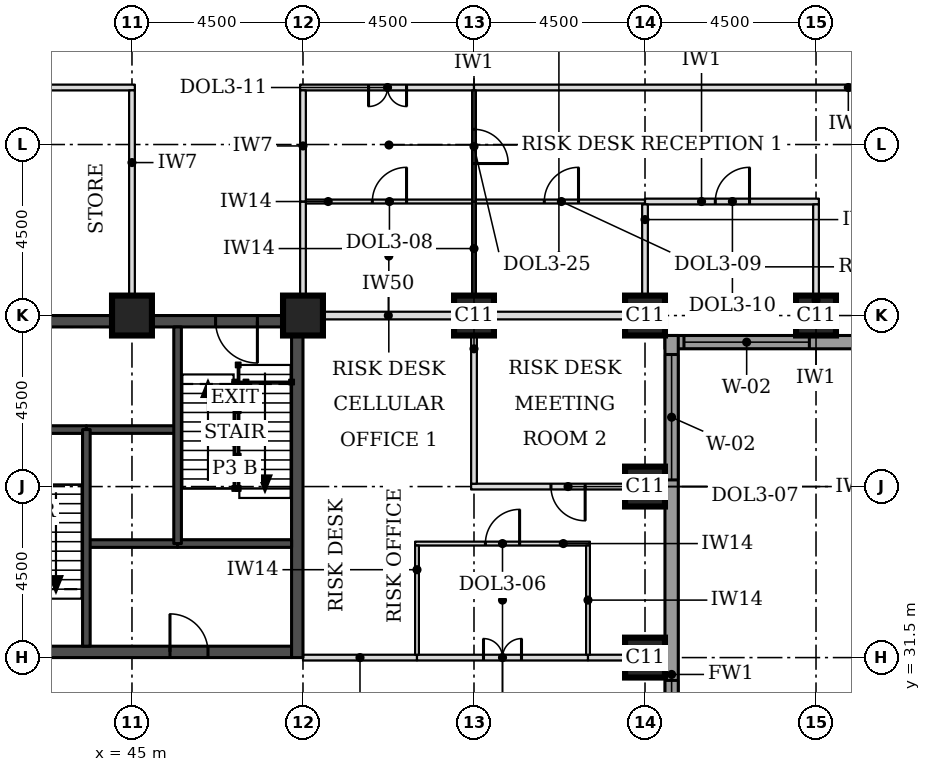
"""IFC4 building model, lengths in metres.
Left out: names, types, materials, properties, quantities, classifications, styles, units other than length and angle.
Written with IfcOpenShell. Run it as: python <this file> out.ifc"""

import sys

from ifc_helpers import new_model, si_unit, direction, frame, frame_2d, origin, origin_2d, place, context, subcontext, project, spatial, rectangle, extrude, element, fill, save


model = new_model("IFC4")
c1 = context("Model", 3, precision=1e-05, world=origin(), true_north=direction((0.0, 1.0)))
c2 = subcontext(c1, "Body", "Model", "MODEL_VIEW")
j1 = project(units=[si_unit("LENGTHUNIT", "METRE"), si_unit("PLANEANGLEUNIT", "RADIAN")], contexts=[c1])
p1 = place(None, origin())
s1 = spatial("IfcSite", under=j1, at=p1, CompositionType="ELEMENT")
p2 = place(p1, origin())
s2 = spatial("IfcBuilding", under=s1, at=p2, CompositionType="ELEMENT")
p3 = place(p2, frame((0.0, 0.0, 93.7)))
s3 = spatial("IfcBuildingStorey", under=s2, at=p3, CompositionType="ELEMENT", Elevation=93.7)
for number, where, z_axis, x_axis in (
    (1, (58.5, 31.5, 0.0), (0.0, 0.0, 1.0), (1.0, 0.0, 0.0)),
    (2, (58.5, 36.0, 0.0), (0.0, 0.0, 1.0), (1.0, 0.0, 0.0)),
    (3, (45.0, 40.5, 0.0), (0.0, 0.0, 1.0), (1.0, 0.0, 0.0)),
    (4, (49.5, 40.5, 0.0), (0.0, 0.0, 1.0), (1.0, 0.0, 0.0)),
    (5, (54.0, 40.5, 0.0), (0.0, 0.0, 1.0), (1.0, 0.0, 0.0)),
    (6, (58.5, 40.5, 0.0), (0.0, 0.0, 1.0), (1.0, 0.0, 0.0)),
    (7, (63.0, 40.5, 0.0), (0.0, 0.0, 1.0), (1.0, 0.0, 0.0)),
):
    element("IfcColumn", number, at=place(p3, frame(where, z_axis=z_axis, x_axis=x_axis)), inside=s3, PredefinedType="COLUMN", context=c2, shape_type="SweptSolid", body=[
        extrude(rectangle(XDim=1.05, YDim=1.05, at=origin_2d()), origin(), (0.0, 0.0, 1.0), 3.7),
    ])
p4 = place(p3, frame((40.8, 31.65, 0.0), z_axis=(0.0, 0.0, 1.0), x_axis=(1.0, 0.0, 0.0)))
e8 = element("IfcWall", 8, at=p4, inside=s3, PredefinedType="SHEAR", context=c2, shape_type="SweptSolid", body=[
    extrude(rectangle(XDim=8.4, YDim=0.3, at=frame_2d((4.2, 0.0))), origin(), (0.0, 0.0, 1.0), 3.7),
])
p5 = place(p4, frame((5.2, 0.0, 0.0)))
e9 = element("IfcOpeningElement", 9, at=p5, cuts=e8, PredefinedType="OPENING", context=c2, shape_type="SweptSolid", body=[
    extrude(rectangle(XDim=1.0, YDim=2.1, at=frame_2d((0.5, 1.05))), frame((0.0, 0.16, 0.0), z_axis=(0.0, -1.0, 0.0), x_axis=(1.0, 0.0, 0.0)), (0.0, 0.0, 1.0), 0.32),
])
p6 = place(p3, frame((40.8, 40.35, 0.0), z_axis=(0.0, 0.0, 1.0), x_axis=(1.0, 0.0, 0.0)))
e10 = element("IfcWall", 10, at=p6, inside=s3, PredefinedType="SHEAR", context=c2, shape_type="SweptSolid", body=[
    extrude(rectangle(XDim=8.4, YDim=0.3, at=frame_2d((4.2, 0.0))), origin(), (0.0, 0.0, 1.0), 3.7),
])
p7 = place(p6, frame((6.4, 0.0, 0.0)))
e11 = element("IfcOpeningElement", 11, at=p7, cuts=e10, PredefinedType="OPENING", context=c2, shape_type="SweptSolid", body=[
    extrude(rectangle(XDim=1.1, YDim=2.1, at=frame_2d((0.55, 1.05))), frame((0.0, 0.16, 0.0), z_axis=(0.0, -1.0, 0.0), x_axis=(1.0, 0.0, 0.0)), (0.0, 0.0, 1.0), 0.32),
])
p8 = place(p3, frame((49.35, 31.5, 0.0), z_axis=(0.0, 0.0, 1.0), x_axis=(0.0, 1.0, 0.0)))
e12 = element("IfcWall", 12, at=p8, inside=s3, PredefinedType="SHEAR", context=c2, shape_type="SweptSolid", body=[
    extrude(rectangle(XDim=9.0, YDim=0.3, at=frame_2d((4.5, 0.0))), origin(), (0.0, 0.0, 1.0), 3.7),
])
p9 = place(p3, frame((59.025, 39.8, 0.0), z_axis=(0.0, 0.0, 1.0), x_axis=(1.0, 0.0, 0.0)))
e13 = element("IfcWall", 13, at=p9, inside=s3, PredefinedType="STANDARD", context=c2, shape_type="SweptSolid", body=[
    extrude(rectangle(XDim=13.337, YDim=0.35, at=frame_2d((6.669, 0.0))), origin(), (0.0, 0.0, 1.0), 3.525),
])
p10 = place(p9, frame((0.5, 0.0, 0.9)))
e14 = element("IfcOpeningElement", 14, at=p10, cuts=e13, PredefinedType="OPENING", context=c2, shape_type="SweptSolid", body=[
    extrude(rectangle(XDim=3.3, YDim=1.9, at=frame_2d((1.65, 0.95))), frame((0.0, 0.185, 0.0), z_axis=(0.0, -1.0, 0.0), x_axis=(1.0, 0.0, 0.0)), (0.0, 0.0, 1.0), 0.37),
])
p11 = place(p3, frame((59.2, 22.138, 0.0), z_axis=(0.0, 0.0, 1.0), x_axis=(0.0, 1.0, 0.0)))
e15 = element("IfcWall", 15, at=p11, inside=s3, PredefinedType="STANDARD", context=c2, shape_type="SweptSolid", body=[
    extrude(rectangle(XDim=17.837, YDim=0.35, at=frame_2d((8.919, 0.0))), origin(), (0.0, 0.0, 1.0), 3.525),
])
p12 = place(p11, frame((5.462, 0.0, 0.9)))
e16 = element("IfcOpeningElement", 16, at=p12, cuts=e15, PredefinedType="OPENING", context=c2, shape_type="SweptSolid", body=[
    extrude(rectangle(XDim=3.3, YDim=1.9, at=frame_2d((1.65, 0.95))), frame((0.0, 0.185, 0.0), z_axis=(0.0, -1.0, 0.0), x_axis=(1.0, 0.0, 0.0)), (0.0, 0.0, 1.0), 0.37),
])
p13 = place(p11, frame((14.037, 0.0, 0.9)))
e17 = element("IfcOpeningElement", 17, at=p13, cuts=e15, PredefinedType="OPENING", context=c2, shape_type="SweptSolid", body=[
    extrude(rectangle(XDim=3.3, YDim=1.9, at=frame_2d((1.65, 0.95))), frame((0.0, 0.185, 0.0), z_axis=(0.0, -1.0, 0.0), x_axis=(1.0, 0.0, 0.0)), (0.0, 0.0, 1.0), 0.37),
])
p14 = place(p3, frame((49.5, 31.5, 0.0), z_axis=(0.0, 0.0, 1.0), x_axis=(1.0, 0.0, 0.0)))
e18 = element("IfcWall", 18, at=p14, inside=s3, PredefinedType="PARTITIONING", context=c2, shape_type="SweptSolid", body=[
    extrude(rectangle(XDim=3.0, YDim=0.15, at=frame_2d((1.5, 0.0))), origin(), (0.0, 0.0, 1.0), 2.55),
])
p15 = place(p3, frame((52.5, 31.5, 0.0), z_axis=(0.0, 0.0, 1.0), x_axis=(1.0, 0.0, 0.0)))
e19 = element("IfcWall", 19, at=p15, inside=s3, PredefinedType="PARTITIONING", context=c2, shape_type="SweptSolid", body=[
    extrude(rectangle(XDim=4.5, YDim=0.15, at=frame_2d((2.25, 0.0))), origin(), (0.0, 0.0, 1.0), 2.55),
])
p16 = place(p15, frame((1.75, 0.0, 0.0)))
e20 = element("IfcOpeningElement", 20, at=p16, cuts=e19, PredefinedType="OPENING", context=c2, shape_type="SweptSolid", body=[
    extrude(rectangle(XDim=1.0, YDim=2.1, at=frame_2d((0.5, 1.05))), frame((0.0, 0.085, 0.0), z_axis=(0.0, -1.0, 0.0), x_axis=(1.0, 0.0, 0.0)), (0.0, 0.0, 1.0), 0.17),
])
p17 = place(p3, frame((57.0, 31.5, 0.0), z_axis=(0.0, 0.0, 1.0), x_axis=(1.0, 0.0, 0.0)))
e21 = element("IfcWall", 21, at=p17, inside=s3, PredefinedType="PARTITIONING", context=c2, shape_type="SweptSolid", body=[
    extrude(rectangle(XDim=2.025, YDim=0.15, at=frame_2d((1.012, 0.0))), origin(), (0.0, 0.0, 1.0), 2.55),
])
p18 = place(p3, frame((52.45, 34.5, 0.0), z_axis=(0.0, 0.0, 1.0), x_axis=(1.0, 0.0, 0.0)))
e22 = element("IfcWall", 22, at=p18, inside=s3, PredefinedType="PARTITIONING", context=c2, shape_type="SweptSolid", body=[
    extrude(rectangle(XDim=4.6, YDim=0.1, at=frame_2d((2.3, 0.0))), origin(), (0.0, 0.0, 1.0), 3.55),
])
p19 = place(p18, frame((1.85, 0.0, 0.0)))
e23 = element("IfcOpeningElement", 23, at=p19, cuts=e22, PredefinedType="OPENING", context=c2, shape_type="SweptSolid", body=[
    extrude(rectangle(XDim=0.9, YDim=2.1, at=frame_2d((0.45, 1.05))), frame((0.0, 0.06, 0.0), z_axis=(0.0, -1.0, 0.0), x_axis=(1.0, 0.0, 0.0)), (0.0, 0.0, 1.0), 0.12),
])
p20 = place(p3, frame((53.925, 36.0, 0.0), z_axis=(0.0, 0.0, 1.0), x_axis=(1.0, 0.0, 0.0)))
e24 = element("IfcWall", 24, at=p20, inside=s3, PredefinedType="PARTITIONING", context=c2, shape_type="SweptSolid", body=[
    extrude(rectangle(XDim=5.1, YDim=0.15, at=frame_2d((2.55, 0.0))), origin(), (0.0, 0.0, 1.0), 3.096),
])
p21 = place(p20, frame((2.1, 0.0, 0.0)))
e25 = element("IfcOpeningElement", 25, at=p21, cuts=e24, PredefinedType="OPENING", context=c2, shape_type="SweptSolid", body=[
    extrude(rectangle(XDim=0.9, YDim=2.1, at=frame_2d((0.45, 1.05))), frame((0.0, 0.085, 0.0), z_axis=(0.0, -1.0, 0.0), x_axis=(1.0, 0.0, 0.0)), (0.0, 0.0, 1.0), 0.17),
])
p22 = place(p3, frame((50.015, 40.5, 0.0), z_axis=(0.0, 0.0, 1.0), x_axis=(1.0, 0.0, 0.0)))
e26 = element("IfcWall", 26, at=p22, inside=s3, PredefinedType="PARTITIONING", context=c2, shape_type="SweptSolid", body=[
    extrude(rectangle(XDim=3.46, YDim=0.2, at=frame_2d((1.73, 0.0))), origin(), (0.0, 0.0, 1.0), 2.8),
])
p23 = place(p3, frame((54.495, 40.5, 0.0), z_axis=(0.0, 0.0, 1.0), x_axis=(1.0, 0.0, 0.0)))
e27 = element("IfcWall", 27, at=p23, inside=s3, PredefinedType="PARTITIONING", context=c2, shape_type="SweptSolid", body=[
    extrude(rectangle(XDim=3.48, YDim=0.2, at=frame_2d((1.74, 0.0))), origin(), (0.0, 0.0, 1.0), 2.8),
])
p24 = place(p3, frame((49.575, 43.5, 0.0), z_axis=(0.0, 0.0, 1.0), x_axis=(1.0, 0.0, 0.0)))
e28 = element("IfcWall", 28, at=p24, inside=s3, PredefinedType="PARTITIONING", context=c2, shape_type="SweptSolid", body=[
    extrude(rectangle(XDim=4.375, YDim=0.1, at=frame_2d((2.188, 0.0))), origin(), (0.0, 0.0, 1.0), 3.55),
])
p25 = place(p24, frame((1.75, 0.0, 0.0)))
e29 = element("IfcOpeningElement", 29, at=p25, cuts=e28, PredefinedType="OPENING", context=c2, shape_type="SweptSolid", body=[
    extrude(rectangle(XDim=0.9, YDim=2.1, at=frame_2d((0.45, 1.05))), frame((0.0, 0.06, 0.0), z_axis=(0.0, -1.0, 0.0), x_axis=(1.0, 0.0, 0.0)), (0.0, 0.0, 1.0), 0.12),
])
p26 = place(p3, frame((54.05, 43.5, 0.0), z_axis=(0.0, 0.0, 1.0), x_axis=(1.0, 0.0, 0.0)))
e30 = element("IfcWall", 30, at=p26, inside=s3, PredefinedType="PARTITIONING", context=c2, shape_type="SweptSolid", body=[
    extrude(rectangle(XDim=4.45, YDim=0.1, at=frame_2d((2.225, 0.0))), origin(), (0.0, 0.0, 1.0), 3.55),
])
p27 = place(p26, frame((1.8, 0.0, 0.0)))
e31 = element("IfcOpeningElement", 31, at=p27, cuts=e30, PredefinedType="OPENING", context=c2, shape_type="SweptSolid", body=[
    extrude(rectangle(XDim=0.9, YDim=2.1, at=frame_2d((0.45, 1.05))), frame((0.0, 0.06, 0.0), z_axis=(0.0, -1.0, 0.0), x_axis=(1.0, 0.0, 0.0)), (0.0, 0.0, 1.0), 0.12),
])
p28 = place(p3, frame((58.5, 43.5, 0.0), z_axis=(0.0, 0.0, 1.0), x_axis=(1.0, 0.0, 0.0)))
e32 = element("IfcWall", 32, at=p28, inside=s3, PredefinedType="PARTITIONING", context=c2, shape_type="SweptSolid", body=[
    extrude(rectangle(XDim=4.575, YDim=0.15, at=frame_2d((2.288, 0.0))), origin(), (0.0, 0.0, 1.0), 3.55),
])
p29 = place(p28, frame((1.85, 0.0, 0.0)))
e33 = element("IfcOpeningElement", 33, at=p29, cuts=e32, PredefinedType="OPENING", context=c2, shape_type="SweptSolid", body=[
    extrude(rectangle(XDim=0.9, YDim=2.1, at=frame_2d((0.45, 1.05))), frame((0.0, 0.085, 0.0), z_axis=(0.0, -1.0, 0.0), x_axis=(1.0, 0.0, 0.0)), (0.0, 0.0, 1.0), 0.17),
])
p30 = place(p3, frame((40.425, 46.5, 0.0), z_axis=(0.0, 0.0, 1.0), x_axis=(1.0, 0.0, 0.0)))
e34 = element("IfcWall", 34, at=p30, inside=s3, PredefinedType="PARTITIONING", context=c2, shape_type="SweptSolid", body=[
    extrude(rectangle(XDim=4.65, YDim=0.15, at=frame_2d((2.325, 0.0))), origin(), (0.0, 0.0, 1.0), 3.55),
])
p31 = place(p3, frame((49.425, 46.5, 0.0), z_axis=(0.0, 0.0, 1.0), x_axis=(1.0, 0.0, 0.0)))
e35 = element("IfcWall", 35, at=p31, inside=s3, PredefinedType="PARTITIONING", context=c2, shape_type="SweptSolid", body=[
    extrude(rectangle(XDim=4.575, YDim=0.15, at=frame_2d((2.288, 0.0))), origin(), (0.0, 0.0, 1.0), 3.55),
])
p32 = place(p31, frame((1.8, 0.0, 0.0)))
e36 = element("IfcOpeningElement", 36, at=p32, cuts=e35, PredefinedType="OPENING", context=c2, shape_type="SweptSolid", body=[
    extrude(rectangle(XDim=1.0, YDim=2.1, at=frame_2d((0.5, 1.05))), frame((0.0, 0.085, 0.0), z_axis=(0.0, -1.0, 0.0), x_axis=(1.0, 0.0, 0.0)), (0.0, 0.0, 1.0), 0.17),
])
p33 = place(p3, frame((54.0, 46.5, 0.0), z_axis=(0.0, 0.0, 1.0), x_axis=(1.0, 0.0, 0.0)))
e37 = element("IfcWall", 37, at=p33, inside=s3, PredefinedType="PARTITIONING", context=c2, shape_type="SweptSolid", body=[
    extrude(rectangle(XDim=16.5, YDim=0.15, at=frame_2d((8.25, 0.0))), origin(), (0.0, 0.0, 1.0), 3.55),
])
for number, where, z_axis, x_axis in (
    (38, (52.5, 31.575, 0.0), (0.0, 0.0, 1.0), (0.0, 1.0, 0.0)),
    (39, (57.0, 31.575, 0.0), (0.0, 0.0, 1.0), (0.0, 1.0, 0.0)),
):
    element("IfcWall", number, at=place(p3, frame(where, z_axis=z_axis, x_axis=x_axis)), inside=s3, PredefinedType="PARTITIONING", context=c2, shape_type="SweptSolid", body=[
        extrude(rectangle(XDim=2.875, YDim=0.1, at=frame_2d((1.438, 0.0))), origin(), (0.0, 0.0, 1.0), 3.55),
    ])
p34 = place(p3, frame((54.0, 36.075, 0.0), z_axis=(0.0, 0.0, 1.0), x_axis=(0.0, 1.0, 0.0)))
e40 = element("IfcWall", 40, at=p34, inside=s3, PredefinedType="PARTITIONING", context=c2, shape_type="SweptSolid", body=[
    extrude(rectangle(XDim=3.9, YDim=0.15, at=frame_2d((1.95, 0.0))), origin(), (0.0, 0.0, 1.0), 3.55),
])
p35 = place(p3, frame((63.0, 39.975, 0.0), z_axis=(0.0, 0.0, 1.0), x_axis=(0.0, 1.0, 0.0)))
e41 = element("IfcWall", 41, at=p35, inside=s3, PredefinedType="PARTITIONING", context=c2, shape_type="SweptSolid", body=[
    extrude(rectangle(XDim=3.45, YDim=0.15, at=frame_2d((1.725, 0.0))), origin(), (0.0, 0.0, 1.0), 3.55),
])
p36 = place(p3, frame((45.0, 41.025, 0.0), z_axis=(0.0, 0.0, 1.0), x_axis=(0.0, 1.0, 0.0)))
e42 = element("IfcWall", 42, at=p36, inside=s3, PredefinedType="PARTITIONING", context=c2, shape_type="SweptSolid", body=[
    extrude(rectangle(XDim=5.4, YDim=0.15, at=frame_2d((2.7, 0.0))), origin(), (0.0, 0.0, 1.0), 3.55),
])
p37 = place(p3, frame((49.5, 41.025, 0.0), z_axis=(0.0, 0.0, 1.0), x_axis=(0.0, 1.0, 0.0)))
e43 = element("IfcWall", 43, at=p37, inside=s3, PredefinedType="PARTITIONING", context=c2, shape_type="SweptSolid", body=[
    extrude(rectangle(XDim=2.475, YDim=0.15, at=frame_2d((1.238, 0.0))), origin(), (0.0, 0.0, 1.0), 3.55),
])
p38 = place(p3, frame((54.0, 41.025, 0.0), z_axis=(0.0, 0.0, 1.0), x_axis=(0.0, 1.0, 0.0)))
e44 = element("IfcWall", 44, at=p38, inside=s3, PredefinedType="PARTITIONING", context=c2, shape_type="SweptSolid", body=[
    extrude(rectangle(XDim=2.475, YDim=0.1, at=frame_2d((1.238, 0.0))), origin(), (0.0, 0.0, 1.0), 3.55),
])
p39 = place(p3, frame((58.5, 41.025, 0.0), z_axis=(0.0, 0.0, 1.0), x_axis=(0.0, 1.0, 0.0)))
e45 = element("IfcWall", 45, at=p39, inside=s3, PredefinedType="PARTITIONING", context=c2, shape_type="SweptSolid", body=[
    extrude(rectangle(XDim=2.4, YDim=0.15, at=frame_2d((1.2, 0.0))), origin(), (0.0, 0.0, 1.0), 3.55),
])
p40 = place(p3, frame((49.5, 43.5, 0.0), z_axis=(0.0, 0.0, 1.0), x_axis=(0.0, 1.0, 0.0)))
e46 = element("IfcWall", 46, at=p40, inside=s3, PredefinedType="PARTITIONING", context=c2, shape_type="SweptSolid", body=[
    extrude(rectangle(XDim=2.925, YDim=0.15, at=frame_2d((1.462, 0.0))), origin(), (0.0, 0.0, 1.0), 3.55),
])
p41 = place(p3, frame((54.0, 43.5, 0.0), z_axis=(0.0, 0.0, 1.0), x_axis=(0.0, 1.0, 0.0)))
e47 = element("IfcWall", 47, at=p41, inside=s3, PredefinedType="PARTITIONING", context=c2, shape_type="SweptSolid", body=[
    extrude(rectangle(XDim=2.925, YDim=0.1, at=frame_2d((1.462, 0.0))), origin(), (0.0, 0.0, 1.0), 3.55),
])
p42 = place(p41, frame((1.0, 0.0, 0.0)))
e48 = element("IfcOpeningElement", 48, at=p42, cuts=e47, PredefinedType="OPENING", context=c2, shape_type="SweptSolid", body=[
    extrude(rectangle(XDim=0.9, YDim=2.1, at=frame_2d((0.45, 1.05))), frame((0.0, 0.06, 0.0), z_axis=(0.0, -1.0, 0.0), x_axis=(1.0, 0.0, 0.0)), (0.0, 0.0, 1.0), 0.12),
])
p43 = place(p3, frame((43.8, 34.5, 0.0), z_axis=(0.0, 0.0, 1.0), x_axis=(1.0, 0.0, 0.0)))
e49 = element("IfcWall", 49, at=p43, inside=s3, PredefinedType="SOLIDWALL", context=c2, shape_type="SweptSolid", body=[
    extrude(rectangle(XDim=2.4, YDim=0.2, at=frame_2d((1.2, 0.0))), origin(), (0.0, 0.0, 1.0), 3.55),
])
p44 = place(p3, frame((46.2, 34.5, 0.0), z_axis=(0.0, 0.0, 1.0), x_axis=(1.0, 0.0, 0.0)))
e50 = element("IfcWall", 50, at=p44, inside=s3, PredefinedType="SOLIDWALL", context=c2, shape_type="SweptSolid", body=[
    extrude(rectangle(XDim=3.0, YDim=0.2, at=frame_2d((1.5, 0.0))), origin(), (0.0, 0.0, 1.0), 3.55),
])
p45 = place(p3, frame((43.8, 37.5, 0.0), z_axis=(0.0, 0.0, 1.0), x_axis=(1.0, 0.0, 0.0)))
e51 = element("IfcWall", 51, at=p45, inside=s3, PredefinedType="SOLIDWALL", context=c2, shape_type="SweptSolid", body=[
    extrude(rectangle(XDim=2.4, YDim=0.2, at=frame_2d((1.2, 0.0))), origin(), (0.0, 0.0, 1.0), 3.7),
])
p46 = place(p3, frame((40.8, 37.5, 0.0), z_axis=(0.0, 0.0, 1.0), x_axis=(1.0, 0.0, 0.0)))
e52 = element("IfcWall", 52, at=p46, inside=s3, PredefinedType="SOLIDWALL", context=c2, shape_type="SweptSolid", body=[
    extrude(rectangle(XDim=3.0, YDim=0.2, at=frame_2d((1.5, 0.0))), origin(), (0.0, 0.0, 1.0), 3.55),
])
for number, where, z_axis, x_axis in (
    (53, (43.8, 31.8, 0.0), (0.0, 0.0, 1.0), (0.0, 1.0, 0.0)),
    (54, (46.2, 34.5, 0.0), (0.0, 0.0, 1.0), (0.0, 1.0, 0.0)),
):
    element("IfcWall", number, at=place(p3, frame(where, z_axis=z_axis, x_axis=x_axis)), inside=s3, PredefinedType="SOLIDWALL", context=c2, shape_type="SweptSolid", body=[
        extrude(rectangle(XDim=5.7, YDim=0.2, at=frame_2d((2.85, 0.0))), origin(), (0.0, 0.0, 1.0), 3.55),
    ])
p47 = place(p10, origin())
e55 = element("IfcWindow", 55, at=p47, inside=s3, PartitioningType="SINGLE_PANEL", PredefinedType="WINDOW", context=c2, shape_type="SweptSolid", body=[
    extrude(rectangle(XDim=3.3, YDim=1.9, at=frame_2d((1.65, 0.95))), frame((0.0, 0.085, 0.0), z_axis=(0.0, -1.0, 0.0), x_axis=(1.0, 0.0, 0.0)), (0.0, 0.0, 1.0), 0.06),
])
fill(e14, e55)
p48 = place(p12, origin())
e56 = element("IfcWindow", 56, at=p48, inside=s3, PartitioningType="SINGLE_PANEL", PredefinedType="WINDOW", context=c2, shape_type="SweptSolid", body=[
    extrude(rectangle(XDim=3.3, YDim=1.9, at=frame_2d((1.65, 0.95))), frame((0.0, 0.085, 0.0), z_axis=(0.0, -1.0, 0.0), x_axis=(1.0, 0.0, 0.0)), (0.0, 0.0, 1.0), 0.06),
])
fill(e16, e56)
p49 = place(p13, origin())
e57 = element("IfcWindow", 57, at=p49, inside=s3, PartitioningType="SINGLE_PANEL", PredefinedType="WINDOW", context=c2, shape_type="SweptSolid", body=[
    extrude(rectangle(XDim=3.3, YDim=1.9, at=frame_2d((1.65, 0.95))), frame((0.0, 0.085, 0.0), z_axis=(0.0, -1.0, 0.0), x_axis=(1.0, 0.0, 0.0)), (0.0, 0.0, 1.0), 0.06),
])
fill(e17, e57)
p50 = place(p32, frame((1.0, 0.0, 0.0), z_axis=(0.0, 0.0, 1.0), x_axis=(-1.0, 0.0, 0.0)))
e58 = element("IfcDoor", 58, at=p50, inside=s3, OperationType="DOUBLE_DOOR_SINGLE_SWING", PredefinedType="DOOR", context=c2, shape_type="SweptSolid", body=[
    extrude(rectangle(XDim=1.0, YDim=2.1, at=frame_2d((0.5, 1.05))), frame((0.0, 0.025, 0.0), z_axis=(0.0, -1.0, 0.0), x_axis=(1.0, 0.0, 0.0)), (0.0, 0.0, 1.0), 0.05),
])
fill(e36, e58)
p51 = place(p42, frame((0.9, 0.0, 0.0), z_axis=(0.0, 0.0, 1.0), x_axis=(-1.0, 0.0, 0.0)))
e59 = element("IfcDoor", 59, at=p51, inside=s3, OperationType="SINGLE_SWING_RIGHT", PredefinedType="DOOR", context=c2, shape_type="SweptSolid", body=[
    extrude(rectangle(XDim=0.9, YDim=2.1, at=frame_2d((0.45, 1.05))), frame((0.0, 0.025, 0.0), z_axis=(0.0, -1.0, 0.0), x_axis=(1.0, 0.0, 0.0)), (0.0, 0.0, 1.0), 0.05),
])
fill(e48, e59)
p52 = place(p25, origin())
e60 = element("IfcDoor", 60, at=p52, inside=s3, OperationType="SINGLE_SWING_RIGHT", PredefinedType="DOOR", context=c2, shape_type="SweptSolid", body=[
    extrude(rectangle(XDim=0.9, YDim=2.1, at=frame_2d((0.45, 1.05))), frame((0.0, 0.025, 0.0), z_axis=(0.0, -1.0, 0.0), x_axis=(1.0, 0.0, 0.0)), (0.0, 0.0, 1.0), 0.05),
])
fill(e29, e60)
p53 = place(p27, origin())
e61 = element("IfcDoor", 61, at=p53, inside=s3, OperationType="SINGLE_SWING_RIGHT", PredefinedType="DOOR", context=c2, shape_type="SweptSolid", body=[
    extrude(rectangle(XDim=0.9, YDim=2.1, at=frame_2d((0.45, 1.05))), frame((0.0, 0.025, 0.0), z_axis=(0.0, -1.0, 0.0), x_axis=(1.0, 0.0, 0.0)), (0.0, 0.0, 1.0), 0.05),
])
fill(e31, e61)
p54 = place(p29, origin())
e62 = element("IfcDoor", 62, at=p54, inside=s3, OperationType="SINGLE_SWING_RIGHT", PredefinedType="DOOR", context=c2, shape_type="SweptSolid", body=[
    extrude(rectangle(XDim=0.9, YDim=2.1, at=frame_2d((0.45, 1.05))), frame((0.0, 0.025, 0.0), z_axis=(0.0, -1.0, 0.0), x_axis=(1.0, 0.0, 0.0)), (0.0, 0.0, 1.0), 0.05),
])
fill(e33, e62)
p55 = place(p16, origin())
e63 = element("IfcDoor", 63, at=p55, inside=s3, OperationType="DOUBLE_DOOR_SINGLE_SWING", PredefinedType="DOOR", context=c2, shape_type="SweptSolid", body=[
    extrude(rectangle(XDim=1.0, YDim=2.1, at=frame_2d((0.5, 1.05))), frame((0.0, 0.025, 0.0), z_axis=(0.0, -1.0, 0.0), x_axis=(1.0, 0.0, 0.0)), (0.0, 0.0, 1.0), 0.05),
])
fill(e20, e63)
p56 = place(p19, origin())
e64 = element("IfcDoor", 64, at=p56, inside=s3, OperationType="SINGLE_SWING_RIGHT", PredefinedType="DOOR", context=c2, shape_type="SweptSolid", body=[
    extrude(rectangle(XDim=0.9, YDim=2.1, at=frame_2d((0.45, 1.05))), frame((0.0, 0.025, 0.0), z_axis=(0.0, -1.0, 0.0), x_axis=(1.0, 0.0, 0.0)), (0.0, 0.0, 1.0), 0.05),
])
fill(e23, e64)
p57 = place(p21, frame((0.9, 0.0, 0.0), z_axis=(0.0, 0.0, 1.0), x_axis=(-1.0, 0.0, 0.0)))
e65 = element("IfcDoor", 65, at=p57, inside=s3, OperationType="SINGLE_SWING_LEFT", PredefinedType="DOOR", context=c2, shape_type="SweptSolid", body=[
    extrude(rectangle(XDim=0.9, YDim=2.1, at=frame_2d((0.45, 1.05))), frame((0.0, 0.025, 0.0), z_axis=(0.0, -1.0, 0.0), x_axis=(1.0, 0.0, 0.0)), (0.0, 0.0, 1.0), 0.05),
])
fill(e25, e65)
p58 = place(p7, frame((1.1, 0.0, 0.0), z_axis=(0.0, 0.0, 1.0), x_axis=(-1.0, 0.0, 0.0)))
e66 = element("IfcDoor", 66, at=p58, inside=s3, OperationType="SINGLE_SWING_LEFT", PredefinedType="DOOR", context=c2, shape_type="SweptSolid", body=[
    extrude(rectangle(XDim=1.1, YDim=2.1, at=frame_2d((0.55, 1.05))), frame((0.0, 0.025, 0.0), z_axis=(0.0, -1.0, 0.0), x_axis=(1.0, 0.0, 0.0)), (0.0, 0.0, 1.0), 0.05),
])
fill(e11, e66)
p59 = place(p5, origin())
e67 = element("IfcDoor", 67, at=p59, inside=s3, OperationType="SINGLE_SWING_LEFT", PredefinedType="DOOR", context=c2, shape_type="SweptSolid", body=[
    extrude(rectangle(XDim=1.0, YDim=2.1, at=frame_2d((0.5, 1.05))), frame((0.0, 0.025, 0.0), z_axis=(0.0, -1.0, 0.0), x_axis=(1.0, 0.0, 0.0)), (0.0, 0.0, 1.0), 0.05),
])
fill(e9, e67)
save(model, sys.argv[1])
